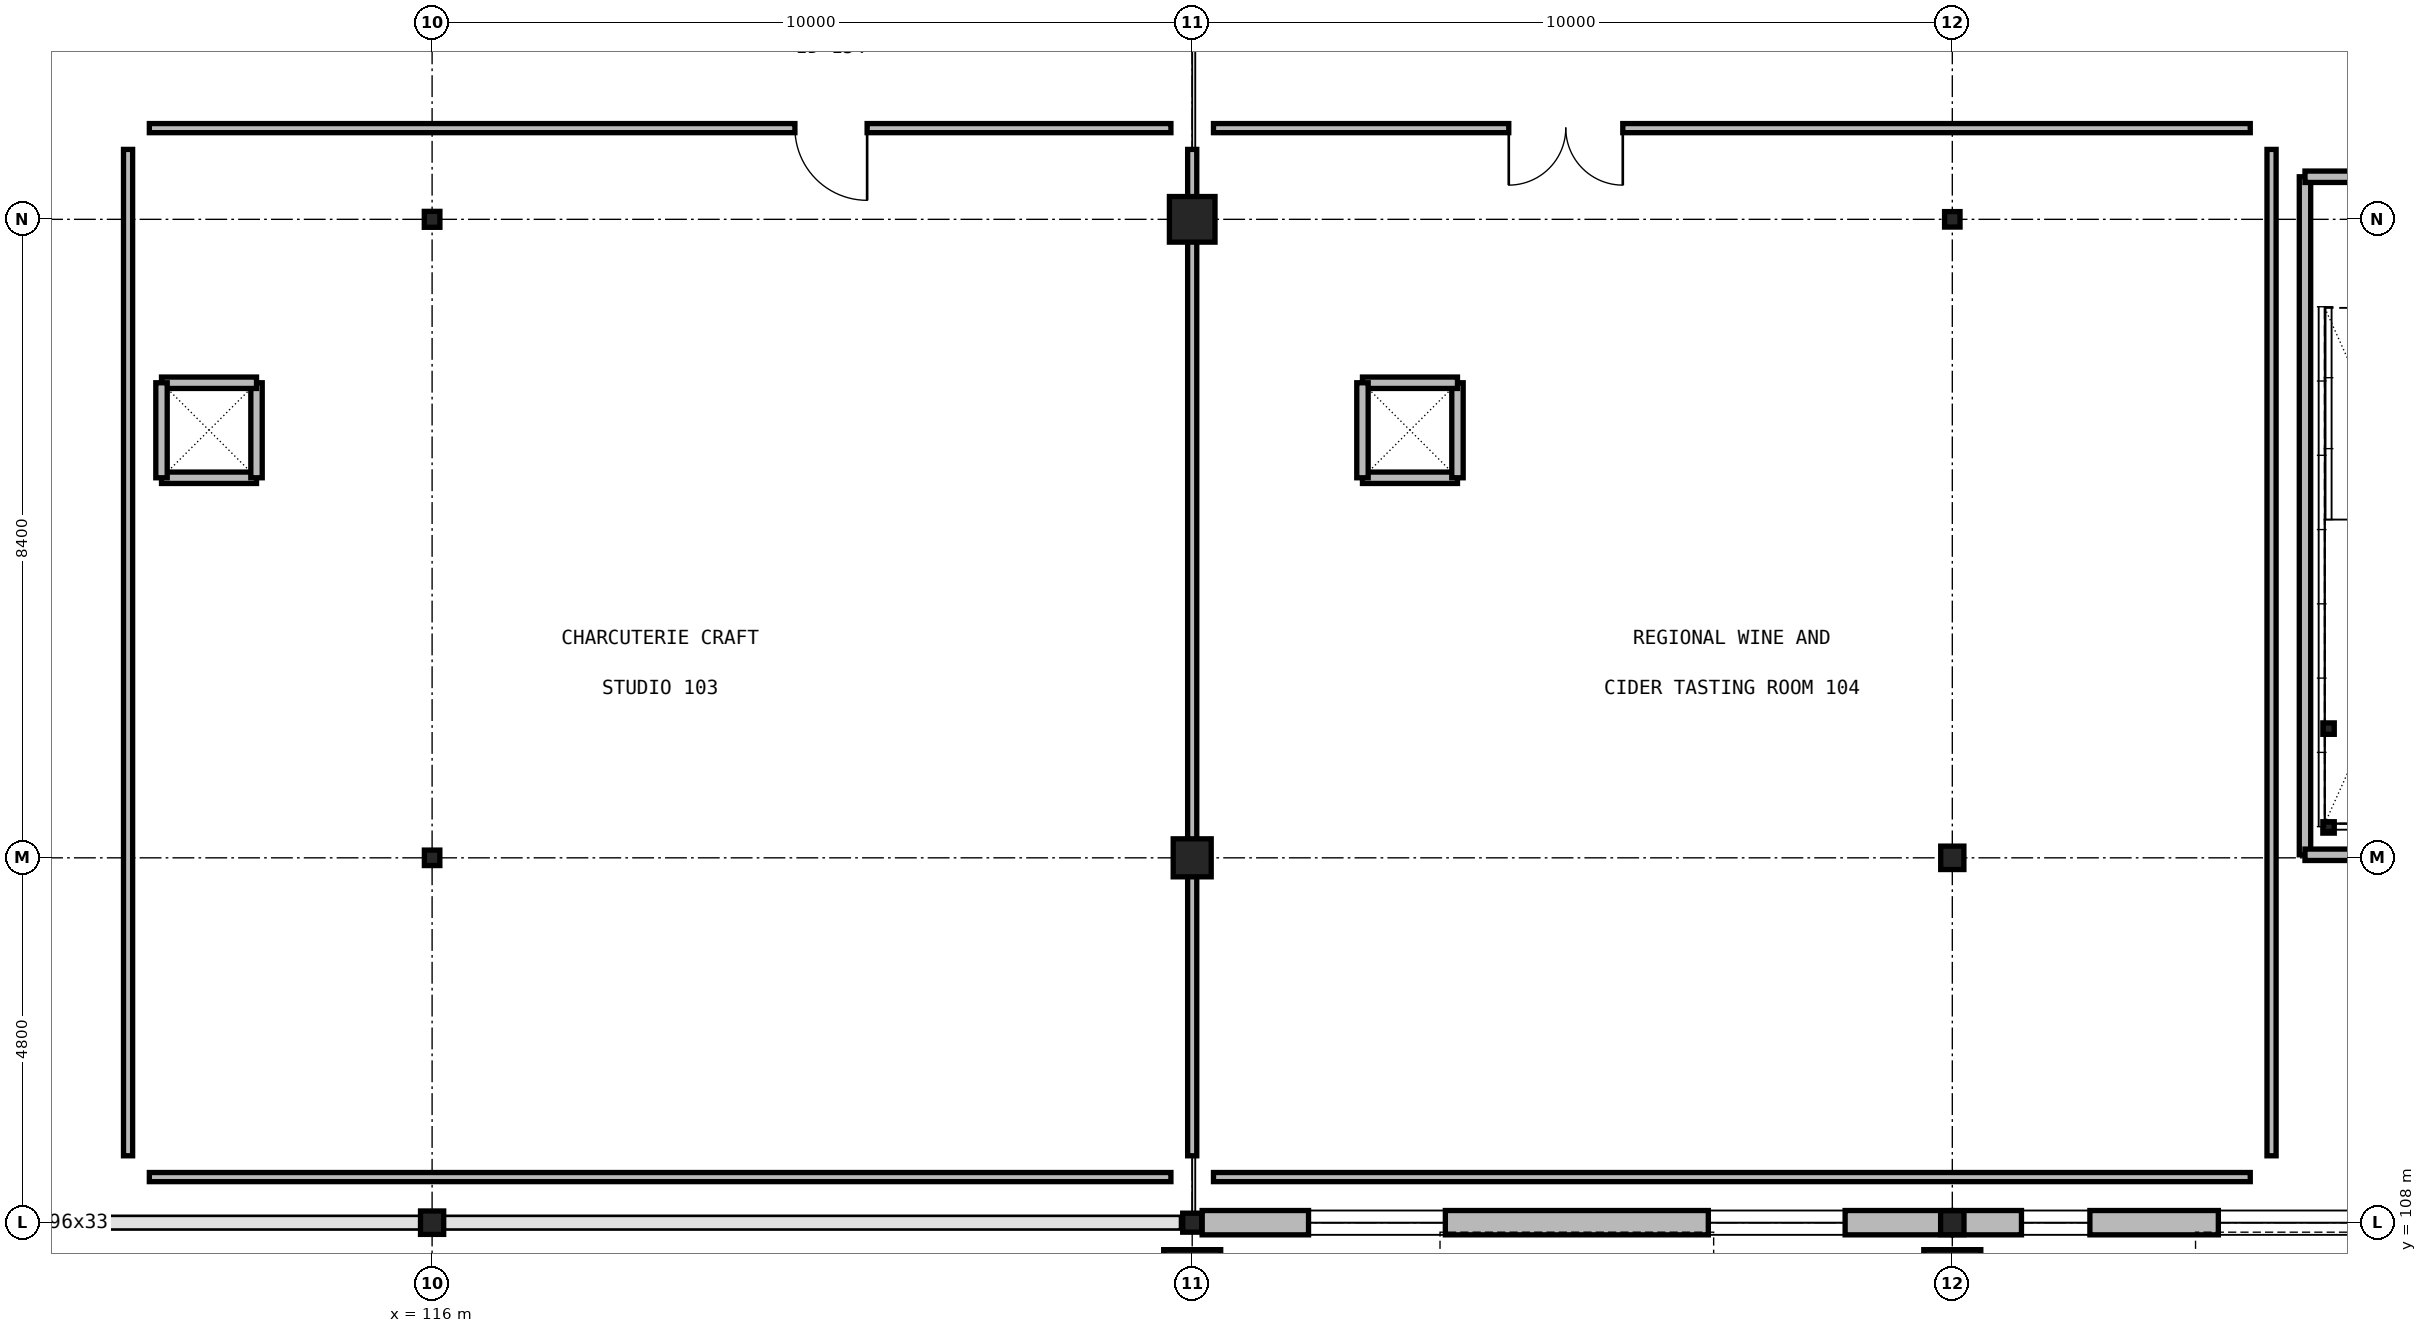
"""IFC4 building model, lengths in metres.
Left out: names, types, materials, properties, quantities, classifications, styles, units other than length and angle.
Written with IfcOpenShell. Run it as: python <this file> out.ifc"""

import sys

from ifc_helpers import new_model, si_unit, direction, frame, frame_2d, origin, origin_2d_with_axis, place, context, subcontext, project, spatial, rectangle, hollow_rectangle, i_section, extrude, element, fill, save


model = new_model("IFC4")
c1 = context("Model", 3, precision=1e-05, world=origin(), true_north=direction((0.0, 1.0)))
c2 = subcontext(c1, "Body", "Model", "MODEL_VIEW")
j1 = project(units=[si_unit("LENGTHUNIT", "METRE"), si_unit("PLANEANGLEUNIT", "RADIAN")], contexts=[c1])
p1 = place(None, origin())
s1 = spatial("IfcSite", under=j1, at=p1, CompositionType="ELEMENT")
p2 = place(p1, origin())
s2 = spatial("IfcBuilding", under=s1, at=p2, CompositionType="ELEMENT")
p3 = place(p2, frame((0.0, 0.0, 4.5)))
s3 = spatial("IfcBuildingStorey", under=s2, at=p3, CompositionType="ELEMENT", Elevation=4.5)
for number, where, z_axis, x_axis in (
    (1, (126.0, 107.42, 0.0), (0.0, 0.0, 1.0), (1.0, 0.0, 0.0)),
    (2, (136.0, 107.42, 0.0), (0.0, 0.0, 1.0), (1.0, 0.0, 0.0)),
):
    element("IfcColumn", number, at=place(p3, frame(where, z_axis=z_axis, x_axis=x_axis)), inside=s3, PredefinedType="PILASTER", context=c2, shape_type="SweptSolid", body=[
        extrude(rectangle(XDim=0.75, YDim=0.45, at=origin_2d_with_axis()), origin(), (0.0, 0.0, 1.0), 3.9),
    ])
p4 = place(p3, frame((116.0, 108.0, 0.0), z_axis=(0.0, 0.0, 1.0), x_axis=(1.0, 0.0, 0.0)))
e3 = element("IfcColumn", 3, at=p4, inside=s3, PredefinedType="COLUMN", context=c2, shape_type="SweptSolid", body=[
    extrude(i_section(OverallWidth=0.305, OverallDepth=0.308, WebThickness=0.01, FlangeThickness=0.015, FilletRadius=0.017, at=origin_2d_with_axis()), origin(), (0.0, 0.0, 1.0), 3.9),
])
p5 = place(p3, frame((116.0, 112.8, 0.0), z_axis=(0.0, 0.0, 1.0), x_axis=(1.0, 0.0, 0.0)))
e4 = element("IfcColumn", 4, at=p5, inside=s3, PredefinedType="COLUMN", context=c2, shape_type="SweptSolid", body=[
    extrude(i_section(OverallWidth=0.203, OverallDepth=0.203, WebThickness=0.007, FlangeThickness=0.011, FilletRadius=0.011, at=origin_2d_with_axis()), origin(), (0.0, 0.0, 1.0), 3.9),
])
p6 = place(p3, frame((116.0, 121.2, 0.0), z_axis=(0.0, 0.0, 1.0), x_axis=(1.0, 0.0, 0.0)))
e5 = element("IfcColumn", 5, at=p6, inside=s3, PredefinedType="COLUMN", context=c2, shape_type="SweptSolid", body=[
    extrude(i_section(OverallWidth=0.205, OverallDepth=0.21, WebThickness=0.009, FlangeThickness=0.014, FilletRadius=0.011, at=origin_2d_with_axis()), origin(), (0.0, 0.0, 1.0), 3.9),
])
p7 = place(p3, frame((126.0, 108.0, 0.0), z_axis=(0.0, 0.0, 1.0), x_axis=(1.0, 0.0, 0.0)))
e6 = element("IfcColumn", 6, at=p7, inside=s3, PredefinedType="COLUMN", context=c2, shape_type="SweptSolid", body=[
    extrude(hollow_rectangle(XDim=0.25, YDim=0.25, WallThickness=0.009, InnerFilletRadius=0.009, OuterFilletRadius=0.018, at=origin_2d_with_axis()), origin(), (0.0, 0.0, 1.0), 3.9),
])
p8 = place(p3, frame((126.0, 112.8, 0.0), z_axis=(0.0, 0.0, 1.0), x_axis=(1.0, 0.0, 0.0)))
e7 = element("IfcColumn", 7, at=p8, inside=s3, PredefinedType="COLUMN", context=c2, shape_type="SweptSolid", body=[
    extrude(rectangle(XDim=0.5, YDim=0.5, at=origin_2d_with_axis()), origin(), (0.0, 0.0, 1.0), 3.9),
])
p9 = place(p3, frame((126.0, 121.2, 0.0), z_axis=(0.0, 0.0, 1.0), x_axis=(1.0, 0.0, 0.0)))
e8 = element("IfcColumn", 8, at=p9, inside=s3, PredefinedType="COLUMN", context=c2, shape_type="SweptSolid", body=[
    extrude(rectangle(XDim=0.6, YDim=0.6, at=origin_2d_with_axis()), origin(), (0.0, 0.0, 1.0), 3.9),
])
p10 = place(p3, frame((136.0, 108.0, 0.0), z_axis=(0.0, 0.0, 1.0), x_axis=(1.0, 0.0, 0.0)))
e9 = element("IfcColumn", 9, at=p10, inside=s3, PredefinedType="COLUMN", context=c2, shape_type="SweptSolid", body=[
    extrude(i_section(OverallWidth=0.307, OverallDepth=0.315, WebThickness=0.012, FlangeThickness=0.019, FilletRadius=0.017, at=origin_2d_with_axis()), origin(), (0.0, 0.0, 1.0), 3.9),
])
p11 = place(p3, frame((136.0, 112.8, 0.0), z_axis=(0.0, 0.0, 1.0), x_axis=(1.0, 0.0, 0.0)))
e10 = element("IfcColumn", 10, at=p11, inside=s3, PredefinedType="COLUMN", context=c2, shape_type="SweptSolid", body=[
    extrude(i_section(OverallWidth=0.305, OverallDepth=0.308, WebThickness=0.01, FlangeThickness=0.015, FilletRadius=0.017, at=origin_2d_with_axis()), origin(), (0.0, 0.0, 1.0), 3.9),
])
p12 = place(p3, frame((136.0, 121.2, 0.0), z_axis=(0.0, 0.0, 1.0), x_axis=(1.0, 0.0, 0.0)))
e11 = element("IfcColumn", 11, at=p12, inside=s3, PredefinedType="COLUMN", context=c2, shape_type="SweptSolid", body=[
    extrude(i_section(OverallWidth=0.203, OverallDepth=0.203, WebThickness=0.007, FlangeThickness=0.011, FilletRadius=0.011, at=origin_2d_with_axis()), origin(), (0.0, 0.0, 1.0), 3.9),
])
for number, where, z_axis, x_axis in (
    (12, (140.95, 113.2, 0.0), (0.0, 0.0, 1.0), (1.0, 0.0, 0.0)),
    (13, (140.95, 114.5, 0.0), (0.0, 0.0, 1.0), (1.0, 0.0, 0.0)),
):
    element("IfcColumn", number, at=place(p3, frame(where, z_axis=z_axis, x_axis=x_axis)), inside=s3, PredefinedType="COLUMN", context=c2, shape_type="SweptSolid", body=[
        extrude(hollow_rectangle(XDim=0.15, YDim=0.15, WallThickness=0.006, InnerFilletRadius=0.006, OuterFilletRadius=0.012, at=origin_2d_with_axis()), origin(), (0.0, 0.0, 1.0), 3.9),
    ])
p13 = place(p3, frame((126.131, 108.0, 0.0), z_axis=(0.0, 0.0, 1.0), x_axis=(1.0, 0.0, 0.0)))
e14 = element("IfcWall", 14, at=p13, inside=s3, PredefinedType="SOLIDWALL", context=c2, shape_type="SweptSolid", body=[
    extrude(rectangle(XDim=9.859, YDim=0.32, at=frame_2d((4.93, 0.0), x_axis=(1.0, 0.0))), origin(), (0.0, 0.0, 1.0), 3.29),
])
p14 = place(p13, frame((1.4, 0.0, 0.85)))
e15 = element("IfcOpeningElement", 15, at=p14, cuts=e14, PredefinedType="OPENING", context=c2, shape_type="SweptSolid", body=[
    extrude(rectangle(XDim=1.8, YDim=1.9, at=frame_2d((0.9, 0.95), x_axis=(1.0, 0.0))), frame((0.0, 0.17, 0.0), z_axis=(0.0, -1.0, 0.0), x_axis=(1.0, 0.0, 0.0)), (0.0, 0.0, 1.0), 0.34),
])
p15 = place(p13, frame((6.659, 0.0, 0.85)))
e16 = element("IfcOpeningElement", 16, at=p15, cuts=e14, PredefinedType="OPENING", context=c2, shape_type="SweptSolid", body=[
    extrude(rectangle(XDim=1.8, YDim=1.9, at=frame_2d((0.9, 0.95), x_axis=(1.0, 0.0))), frame((0.0, 0.17, 0.0), z_axis=(0.0, -1.0, 0.0), x_axis=(1.0, 0.0, 0.0)), (0.0, 0.0, 1.0), 0.34),
])
p16 = place(p3, frame((136.01, 108.0, 0.0), z_axis=(0.0, 0.0, 1.0), x_axis=(1.0, 0.0, 0.0)))
e17 = element("IfcWall", 17, at=p16, inside=s3, PredefinedType="SOLIDWALL", context=c2, shape_type="SweptSolid", body=[
    extrude(rectangle(XDim=9.98, YDim=0.32, at=frame_2d((4.99, 0.0), x_axis=(1.0, 0.0))), origin(), (0.0, 0.0, 1.0), 3.29),
])
p17 = place(p16, frame((3.49, 0.0, 0.85)))
e18 = element("IfcOpeningElement", 18, at=p17, cuts=e17, PredefinedType="OPENING", context=c2, shape_type="SweptSolid", body=[
    extrude(rectangle(XDim=3.0, YDim=1.9, at=frame_2d((1.5, 0.95), x_axis=(1.0, 0.0))), frame((0.0, 0.17, 0.0), z_axis=(0.0, -1.0, 0.0), x_axis=(1.0, 0.0, 0.0)), (0.0, 0.0, 1.0), 0.34),
])
p18 = place(p16, frame((0.9, 0.0, 0.85)))
e19 = element("IfcOpeningElement", 19, at=p18, cuts=e17, PredefinedType="OPENING", context=c2, shape_type="SweptSolid", body=[
    extrude(rectangle(XDim=0.9, YDim=1.9, at=frame_2d((0.45, 0.95), x_axis=(1.0, 0.0))), frame((0.0, 0.17, 0.0), z_axis=(0.0, -1.0, 0.0), x_axis=(1.0, 0.0, 0.0)), (0.0, 0.0, 1.0), 0.34),
])
p19 = place(p16, frame((8.18, 0.0, 0.85)))
e20 = element("IfcOpeningElement", 20, at=p19, cuts=e17, PredefinedType="OPENING", context=c2, shape_type="SweptSolid", body=[
    extrude(rectangle(XDim=0.9, YDim=1.9, at=frame_2d((0.45, 0.95), x_axis=(1.0, 0.0))), frame((0.0, 0.17, 0.0), z_axis=(0.0, -1.0, 0.0), x_axis=(1.0, 0.0, 0.0)), (0.0, 0.0, 1.0), 0.34),
])
p20 = place(p3, frame((140.64, 121.76, 0.0), z_axis=(0.0, 0.0, 1.0), x_axis=(0.0, -1.0, 0.0)))
e21 = element("IfcWall", 21, at=p20, inside=s3, PredefinedType="PARTITIONING", context=c2, shape_type="SweptSolid", body=[
    extrude(rectangle(XDim=8.92, YDim=0.15, at=frame_2d((4.46, 0.0), x_axis=(1.0, 0.0))), origin(), (0.0, 0.0, 1.0), 3.07),
])
p21 = place(p3, frame((140.64, 112.84, 0.0), z_axis=(0.0, 0.0, 1.0), x_axis=(1.0, 0.0, 0.0)))
e22 = element("IfcWall", 22, at=p21, inside=s3, PredefinedType="PARTITIONING", context=c2, shape_type="SweptSolid", body=[
    extrude(rectangle(XDim=3.62, YDim=0.15, at=frame_2d((1.81, 0.0), x_axis=(1.0, 0.0))), origin(), (0.0, 0.0, 1.0), 3.07),
])
p22 = place(p3, frame((144.26, 121.76, 0.0), z_axis=(0.0, 0.0, 1.0), x_axis=(-1.0, 0.0, 0.0)))
e23 = element("IfcWall", 23, at=p22, inside=s3, PredefinedType="PARTITIONING", context=c2, shape_type="SweptSolid", body=[
    extrude(rectangle(XDim=3.62, YDim=0.15, at=frame_2d((1.81, 0.0), x_axis=(1.0, 0.0))), origin(), (0.0, 0.0, 1.0), 3.07),
])
p23 = place(p22, frame((1.31, 0.0, 0.0)))
e24 = element("IfcOpeningElement", 24, at=p23, cuts=e23, PredefinedType="OPENING", context=c2, shape_type="SweptSolid", body=[
    extrude(rectangle(XDim=1.0, YDim=2.15, at=frame_2d((0.5, 1.075), x_axis=(1.0, 0.0))), frame((0.0, 0.085, 0.0), z_axis=(0.0, -1.0, 0.0), x_axis=(1.0, 0.0, 0.0)), (0.0, 0.0, 1.0), 0.17),
])
for number, where, z_axis, x_axis in (
    (25, (112.44, 117.8, 0.0), (0.0, 0.0, 1.0), (1.0, 0.0, 0.0)),
    (26, (113.69, 117.8, 0.0), (0.0, 0.0, 1.0), (0.0, 1.0, 0.0)),
    (27, (113.69, 119.05, 0.0), (0.0, 0.0, 1.0), (-1.0, 0.0, 0.0)),
    (28, (112.44, 119.05, 0.0), (0.0, 0.0, 1.0), (0.0, -1.0, 0.0)),
    (29, (128.24, 117.8, 0.0), (0.0, 0.0, 1.0), (1.0, 0.0, 0.0)),
    (30, (129.49, 117.8, 0.0), (0.0, 0.0, 1.0), (0.0, 1.0, 0.0)),
    (31, (129.49, 119.05, 0.0), (0.0, 0.0, 1.0), (-1.0, 0.0, 0.0)),
    (32, (128.24, 119.05, 0.0), (0.0, 0.0, 1.0), (0.0, -1.0, 0.0)),
):
    element("IfcWall", number, at=place(p3, frame(where, z_axis=z_axis, x_axis=x_axis)), inside=s3, PredefinedType="PARTITIONING", context=c2, shape_type="SweptSolid", body=[
        extrude(rectangle(XDim=1.25, YDim=0.15, at=frame_2d((0.625, 0.0), x_axis=(1.0, 0.0))), origin(), (0.0, 0.0, 1.0), 3.17),
    ])
p24 = place(p3, frame((112.28, 108.6, 0.0), z_axis=(0.0, 0.0, 1.0), x_axis=(1.0, 0.0, 0.0)))
e33 = element("IfcWall", 33, at=p24, inside=s3, PredefinedType="PARTITIONING", context=c2, shape_type="SweptSolid", body=[
    extrude(rectangle(XDim=13.44, YDim=0.12, at=frame_2d((6.72, 0.0), x_axis=(1.0, 0.0))), origin(), (0.0, 0.0, 1.0), 3.03),
])
p25 = place(p3, frame((126.0, 108.88, 0.0), z_axis=(0.0, 0.0, 1.0), x_axis=(0.0, 1.0, 0.0)))
e34 = element("IfcWall", 34, at=p25, inside=s3, PredefinedType="PARTITIONING", context=c2, shape_type="SweptSolid", body=[
    extrude(rectangle(XDim=13.24, YDim=0.12, at=frame_2d((6.62, 0.0), x_axis=(1.0, 0.0))), origin(), (0.0, 0.0, 1.0), 3.03),
])
p26 = place(p3, frame((125.72, 122.4, 0.0), z_axis=(0.0, 0.0, 1.0), x_axis=(-1.0, 0.0, 0.0)))
e35 = element("IfcWall", 35, at=p26, inside=s3, PredefinedType="PARTITIONING", context=c2, shape_type="SweptSolid", body=[
    extrude(rectangle(XDim=13.44, YDim=0.12, at=frame_2d((6.72, 0.0), x_axis=(1.0, 0.0))), origin(), (0.0, 0.0, 1.0), 3.03),
])
p27 = place(p26, frame((3.997, 0.0, 0.0)))
e36 = element("IfcOpeningElement", 36, at=p27, cuts=e35, PredefinedType="OPENING", context=c2, shape_type="SweptSolid", body=[
    extrude(rectangle(XDim=0.95, YDim=2.15, at=frame_2d((0.475, 1.075), x_axis=(1.0, 0.0))), frame((0.0, 0.07, 0.0), z_axis=(0.0, -1.0, 0.0), x_axis=(1.0, 0.0, 0.0)), (0.0, 0.0, 1.0), 0.14),
])
p28 = place(p3, frame((112.0, 122.12, 0.0), z_axis=(0.0, 0.0, 1.0), x_axis=(0.0, -1.0, 0.0)))
e37 = element("IfcWall", 37, at=p28, inside=s3, PredefinedType="PARTITIONING", context=c2, shape_type="SweptSolid", body=[
    extrude(rectangle(XDim=13.24, YDim=0.12, at=frame_2d((6.62, 0.0), x_axis=(1.0, 0.0))), origin(), (0.0, 0.0, 1.0), 3.03),
])
p29 = place(p3, frame((126.28, 108.6, 0.0), z_axis=(0.0, 0.0, 1.0), x_axis=(1.0, 0.0, 0.0)))
e38 = element("IfcWall", 38, at=p29, inside=s3, PredefinedType="PARTITIONING", context=c2, shape_type="SweptSolid", body=[
    extrude(rectangle(XDim=13.64, YDim=0.12, at=frame_2d((6.82, 0.0), x_axis=(1.0, 0.0))), origin(), (0.0, 0.0, 1.0), 3.03),
])
p30 = place(p3, frame((140.2, 108.88, 0.0), z_axis=(0.0, 0.0, 1.0), x_axis=(0.0, 1.0, 0.0)))
e39 = element("IfcWall", 39, at=p30, inside=s3, PredefinedType="PARTITIONING", context=c2, shape_type="SweptSolid", body=[
    extrude(rectangle(XDim=13.24, YDim=0.12, at=frame_2d((6.62, 0.0), x_axis=(1.0, 0.0))), origin(), (0.0, 0.0, 1.0), 3.03),
])
p31 = place(p3, frame((139.92, 122.4, 0.0), z_axis=(0.0, 0.0, 1.0), x_axis=(-1.0, 0.0, 0.0)))
e40 = element("IfcWall", 40, at=p31, inside=s3, PredefinedType="PARTITIONING", context=c2, shape_type="SweptSolid", body=[
    extrude(rectangle(XDim=13.64, YDim=0.12, at=frame_2d((6.82, 0.0), x_axis=(1.0, 0.0))), origin(), (0.0, 0.0, 1.0), 3.03),
])
p32 = place(p31, frame((8.255, 0.0, 0.0)))
e41 = element("IfcOpeningElement", 41, at=p32, cuts=e40, PredefinedType="OPENING", context=c2, shape_type="SweptSolid", body=[
    extrude(rectangle(XDim=1.5, YDim=2.25, at=frame_2d((0.75, 1.125), x_axis=(1.0, 0.0))), frame((0.0, 0.07, 0.0), z_axis=(0.0, -1.0, 0.0), x_axis=(1.0, 0.0, 0.0)), (0.0, 0.0, 1.0), 0.14),
])
p33 = place(p14, origin())
e42 = element("IfcWindow", 42, at=p33, inside=s3, PartitioningType="SINGLE_PANEL", PredefinedType="WINDOW", context=c2, shape_type="SweptSolid", body=[
    extrude(rectangle(XDim=1.8, YDim=1.9, at=frame_2d((0.9, 0.95), x_axis=(1.0, 0.0))), frame((0.0, 0.03, 0.0), z_axis=(0.0, -1.0, 0.0), x_axis=(1.0, 0.0, 0.0)), (0.0, 0.0, 1.0), 0.06),
])
fill(e15, e42)
p34 = place(p15, origin())
e43 = element("IfcWindow", 43, at=p34, inside=s3, PartitioningType="SINGLE_PANEL", PredefinedType="WINDOW", context=c2, shape_type="SweptSolid", body=[
    extrude(rectangle(XDim=1.8, YDim=1.9, at=frame_2d((0.9, 0.95), x_axis=(1.0, 0.0))), frame((0.0, 0.03, 0.0), z_axis=(0.0, -1.0, 0.0), x_axis=(1.0, 0.0, 0.0)), (0.0, 0.0, 1.0), 0.06),
])
fill(e16, e43)
p35 = place(p17, origin())
e44 = element("IfcWindow", 44, at=p35, inside=s3, PartitioningType="SINGLE_PANEL", PredefinedType="WINDOW", context=c2, shape_type="SweptSolid", body=[
    extrude(rectangle(XDim=3.0, YDim=1.9, at=frame_2d((1.5, 0.95), x_axis=(1.0, 0.0))), frame((0.0, 0.03, 0.0), z_axis=(0.0, -1.0, 0.0), x_axis=(1.0, 0.0, 0.0)), (0.0, 0.0, 1.0), 0.06),
])
fill(e18, e44)
p36 = place(p18, origin())
e45 = element("IfcWindow", 45, at=p36, inside=s3, PartitioningType="SINGLE_PANEL", PredefinedType="WINDOW", context=c2, shape_type="SweptSolid", body=[
    extrude(rectangle(XDim=0.9, YDim=1.9, at=frame_2d((0.45, 0.95), x_axis=(1.0, 0.0))), frame((0.0, 0.03, 0.0), z_axis=(0.0, -1.0, 0.0), x_axis=(1.0, 0.0, 0.0)), (0.0, 0.0, 1.0), 0.06),
])
fill(e19, e45)
p37 = place(p27, origin())
e46 = element("IfcDoor", 46, at=p37, inside=s3, OperationType="SINGLE_SWING_LEFT", PredefinedType="DOOR", context=c2, shape_type="SweptSolid", body=[
    extrude(rectangle(XDim=0.95, YDim=2.15, at=frame_2d((0.475, 1.075), x_axis=(1.0, 0.0))), frame((0.0, 0.025, 0.0), z_axis=(0.0, -1.0, 0.0), x_axis=(1.0, 0.0, 0.0)), (0.0, 0.0, 1.0), 0.05),
])
fill(e36, e46)
p38 = place(p32, origin())
e47 = element("IfcDoor", 47, at=p38, inside=s3, OperationType="DOUBLE_SWING_RIGHT", PredefinedType="DOOR", context=c2, shape_type="SweptSolid", body=[
    extrude(rectangle(XDim=1.5, YDim=2.25, at=frame_2d((0.75, 1.125), x_axis=(1.0, 0.0))), frame((0.0, 0.025, 0.0), z_axis=(0.0, -1.0, 0.0), x_axis=(1.0, 0.0, 0.0)), (0.0, 0.0, 1.0), 0.05),
])
fill(e41, e47)
save(model, sys.argv[1])
